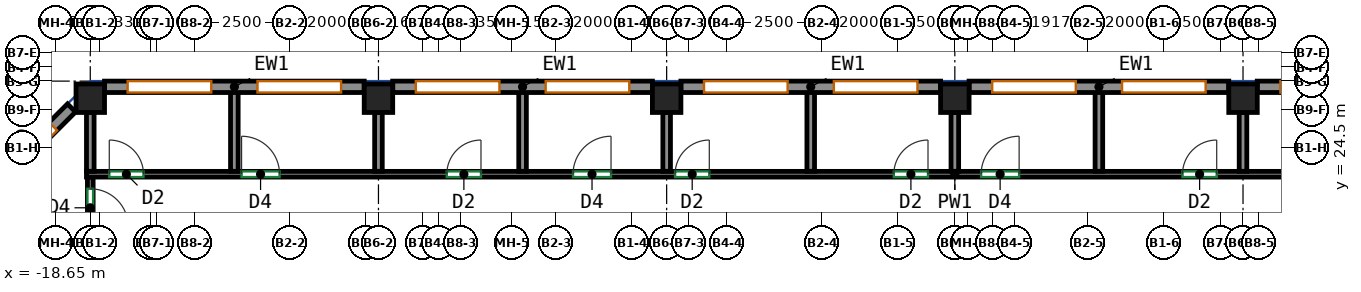
"""IFC4 building model, lengths in metres.
Left out: names, types, materials, properties, quantities, classifications, styles, units other than length and angle.
Written with IfcOpenShell. Run it as: python <this file> out.ifc"""

import sys

from ifc_helpers import new_model, si_unit, direction, frame, frame_2d, origin, origin_2d, place, context, subcontext, project, spatial, rectangle, extrude, source, transform, mapped, element, fill, save


model = new_model("IFC4")
c1 = context("Model", 3, precision=1e-05, world=origin(), true_north=direction((0.0, 1.0)))
c2 = subcontext(c1, "Body", "Model", "MODEL_VIEW")
j1 = project(units=[si_unit("LENGTHUNIT", "METRE"), si_unit("PLANEANGLEUNIT", "RADIAN")], contexts=[c1])
p1 = place(None, origin())
s1 = spatial("IfcSite", under=j1, at=p1, CompositionType="ELEMENT")
p2 = place(p1, origin())
s2 = spatial("IfcBuilding", under=s1, at=p2, CompositionType="ELEMENT")
p3 = place(p2, frame((0.0, 0.0, 206.7)))
s3 = spatial("IfcBuildingStorey", under=s2, at=p3, CompositionType="ELEMENT", Elevation=206.7)
m1 = source(origin(), c2, "Body", "SweptSolid", [
    extrude(rectangle(XDim=0.75, YDim=0.75, at=origin_2d()), origin(), (0.0, 0.0, 1.0), 3.12),
])
for number, where, z_axis, x_axis in (
    (1, (-17.75, 25.8, 0.0), (0.0, 0.0, 1.0), (1.0, 0.0, 0.0)),
    (2, (-10.167, 25.8, 0.0), (0.0, 0.0, 1.0), (1.0, 0.0, 0.0)),
    (3, (-2.583, 25.8, 0.0), (0.0, 0.0, 1.0), (1.0, 0.0, 0.0)),
    (4, (5.0, 25.8, 0.0), (0.0, 0.0, 1.0), (1.0, 0.0, 0.0)),
    (5, (12.583, 25.8, 0.0), (0.0, 0.0, 1.0), (1.0, 0.0, 0.0)),
):
    element("IfcColumn", number, at=place(p3, frame(where, z_axis=z_axis, x_axis=x_axis)), inside=s3, PredefinedType="COLUMN", context=c2, shape_type="MappedRepresentation", body=[
        mapped(m1, transform((0.0, 0.0, 0.0))),
    ])
m2 = source(origin(), c2, "Body", "SweptSolid", [
    extrude(rectangle(XDim=6.833, YDim=0.3, at=frame_2d((3.417, 0.0))), origin(), (0.0, 0.0, 1.0), 3.12),
])
p4 = place(p3, frame((19.792, 26.1, 0.0), z_axis=(0.0, 0.0, 1.0), x_axis=(-1.0, 0.0, 0.0)))
e6 = element("IfcWall", 6, at=p4, inside=s3, PredefinedType="SOLIDWALL", context=c2, shape_type="MappedRepresentation", body=[
    mapped(m2, transform((0.0, 0.0, 0.0))),
])
p5 = place(p4, frame((0.608, 0.0, 0.85)))
e7 = element("IfcOpeningElement", 7, at=p5, cuts=e6, PredefinedType="OPENING", context=c2, shape_type="SweptSolid", body=[
    extrude(rectangle(XDim=2.2, YDim=1.95, at=frame_2d((1.1, 0.975))), frame((0.0, 0.16, 0.0), z_axis=(0.0, -1.0, 0.0), x_axis=(1.0, 0.0, 0.0)), (0.0, 0.0, 1.0), 0.32),
])
p6 = place(p4, frame((4.025, 0.0, 0.85)))
e8 = element("IfcOpeningElement", 8, at=p6, cuts=e6, PredefinedType="OPENING", context=c2, shape_type="SweptSolid", body=[
    extrude(rectangle(XDim=2.2, YDim=1.95, at=frame_2d((1.1, 0.975))), frame((0.0, 0.16, 0.0), z_axis=(0.0, -1.0, 0.0), x_axis=(1.0, 0.0, 0.0)), (0.0, 0.0, 1.0), 0.32),
])
m3 = source(origin(), c2, "Body", "SweptSolid", [
    extrude(rectangle(XDim=6.833, YDim=0.3, at=frame_2d((3.417, 0.0))), origin(), (0.0, 0.0, 1.0), 3.12),
])
p7 = place(p3, frame((12.208, 26.1, 0.0), z_axis=(0.0, 0.0, 1.0), x_axis=(-1.0, 0.0, 0.0)))
e9 = element("IfcWall", 9, at=p7, inside=s3, PredefinedType="SOLIDWALL", context=c2, shape_type="MappedRepresentation", body=[
    mapped(m3, transform((0.0, 0.0, 0.0))),
])
p8 = place(p7, frame((0.608, 0.0, 0.85)))
e10 = element("IfcOpeningElement", 10, at=p8, cuts=e9, PredefinedType="OPENING", context=c2, shape_type="SweptSolid", body=[
    extrude(rectangle(XDim=2.2, YDim=1.95, at=frame_2d((1.1, 0.975))), frame((0.0, 0.16, 0.0), z_axis=(0.0, -1.0, 0.0), x_axis=(1.0, 0.0, 0.0)), (0.0, 0.0, 1.0), 0.32),
])
p9 = place(p7, frame((4.025, 0.0, 0.85)))
e11 = element("IfcOpeningElement", 11, at=p9, cuts=e9, PredefinedType="OPENING", context=c2, shape_type="SweptSolid", body=[
    extrude(rectangle(XDim=2.2, YDim=1.95, at=frame_2d((1.1, 0.975))), frame((0.0, 0.16, 0.0), z_axis=(0.0, -1.0, 0.0), x_axis=(1.0, 0.0, 0.0)), (0.0, 0.0, 1.0), 0.32),
])
p10 = place(p3, frame((4.625, 26.1, 0.0), z_axis=(0.0, 0.0, 1.0), x_axis=(-1.0, 0.0, 0.0)))
e12 = element("IfcWall", 12, at=p10, inside=s3, PredefinedType="SOLIDWALL", context=c2, shape_type="MappedRepresentation", body=[
    mapped(m3, transform((0.0, 0.0, 0.0))),
])
p11 = place(p10, frame((0.608, 0.0, 0.85)))
e13 = element("IfcOpeningElement", 13, at=p11, cuts=e12, PredefinedType="OPENING", context=c2, shape_type="SweptSolid", body=[
    extrude(rectangle(XDim=2.2, YDim=1.95, at=frame_2d((1.1, 0.975))), frame((0.0, 0.16, 0.0), z_axis=(0.0, -1.0, 0.0), x_axis=(1.0, 0.0, 0.0)), (0.0, 0.0, 1.0), 0.32),
])
p12 = place(p10, frame((4.025, 0.0, 0.85)))
e14 = element("IfcOpeningElement", 14, at=p12, cuts=e12, PredefinedType="OPENING", context=c2, shape_type="SweptSolid", body=[
    extrude(rectangle(XDim=2.2, YDim=1.95, at=frame_2d((1.1, 0.975))), frame((0.0, 0.16, 0.0), z_axis=(0.0, -1.0, 0.0), x_axis=(1.0, 0.0, 0.0)), (0.0, 0.0, 1.0), 0.32),
])
p13 = place(p3, frame((-2.958, 26.1, 0.0), z_axis=(0.0, 0.0, 1.0), x_axis=(-1.0, 0.0, 0.0)))
e15 = element("IfcWall", 15, at=p13, inside=s3, PredefinedType="SOLIDWALL", context=c2, shape_type="MappedRepresentation", body=[
    mapped(m2, transform((0.0, 0.0, 0.0))),
])
p14 = place(p13, frame((0.608, 0.0, 0.85)))
e16 = element("IfcOpeningElement", 16, at=p14, cuts=e15, PredefinedType="OPENING", context=c2, shape_type="SweptSolid", body=[
    extrude(rectangle(XDim=2.2, YDim=1.95, at=frame_2d((1.1, 0.975))), frame((0.0, 0.16, 0.0), z_axis=(0.0, -1.0, 0.0), x_axis=(1.0, 0.0, 0.0)), (0.0, 0.0, 1.0), 0.32),
])
p15 = place(p13, frame((4.025, 0.0, 0.85)))
e17 = element("IfcOpeningElement", 17, at=p15, cuts=e15, PredefinedType="OPENING", context=c2, shape_type="SweptSolid", body=[
    extrude(rectangle(XDim=2.2, YDim=1.95, at=frame_2d((1.1, 0.975))), frame((0.0, 0.16, 0.0), z_axis=(0.0, -1.0, 0.0), x_axis=(1.0, 0.0, 0.0)), (0.0, 0.0, 1.0), 0.32),
])
p16 = place(p3, frame((-10.542, 26.1, 0.0), z_axis=(0.0, 0.0, 1.0), x_axis=(-1.0, 0.0, 0.0)))
e18 = element("IfcWall", 18, at=p16, inside=s3, PredefinedType="SOLIDWALL", context=c2, shape_type="MappedRepresentation", body=[
    mapped(m3, transform((0.0, 0.0, 0.0))),
])
p17 = place(p16, frame((0.608, 0.0, 0.85)))
e19 = element("IfcOpeningElement", 19, at=p17, cuts=e18, PredefinedType="OPENING", context=c2, shape_type="SweptSolid", body=[
    extrude(rectangle(XDim=2.2, YDim=1.95, at=frame_2d((1.1, 0.975))), frame((0.0, 0.16, 0.0), z_axis=(0.0, -1.0, 0.0), x_axis=(1.0, 0.0, 0.0)), (0.0, 0.0, 1.0), 0.32),
])
p18 = place(p16, frame((4.025, 0.0, 0.85)))
e20 = element("IfcOpeningElement", 20, at=p18, cuts=e18, PredefinedType="OPENING", context=c2, shape_type="SweptSolid", body=[
    extrude(rectangle(XDim=2.2, YDim=1.95, at=frame_2d((1.1, 0.975))), frame((0.0, 0.16, 0.0), z_axis=(0.0, -1.0, 0.0), x_axis=(1.0, 0.0, 0.0)), (0.0, 0.0, 1.0), 0.32),
])
m4 = source(origin(), c2, "Body", "SweptSolid", [
    extrude(rectangle(XDim=3.571, YDim=0.3, at=frame_2d((1.786, 0.0))), origin(), (0.0, 0.0, 1.0), 3.12),
])
p19 = place(p3, frame((-18.244, 25.544, 0.0), z_axis=(0.0, 0.0, 1.0), x_axis=(-0.707072595841, -0.707140964879, 0.0)))
e21 = element("IfcWall", 21, at=p19, inside=s3, PredefinedType="SOLIDWALL", context=c2, shape_type="MappedRepresentation", body=[
    mapped(m4, transform((0.0, 0.0, 0.0))),
])
p20 = place(p19, frame((0.686, 0.0, 0.85)))
e22 = element("IfcOpeningElement", 22, at=p20, cuts=e21, PredefinedType="OPENING", context=c2, shape_type="SweptSolid", body=[
    extrude(rectangle(XDim=2.2, YDim=1.95, at=frame_2d((1.1, 0.975))), frame((0.0, 0.16, 0.0), z_axis=(0.0, -1.0, 0.0), x_axis=(1.0, 0.0, 0.0)), (0.0, 0.0, 1.0), 0.32),
])
p21 = place(p3, frame((-17.75, 23.725, 0.0), z_axis=(0.0, 0.0, 1.0), x_axis=(0.0, -1.0, 0.0)))
e23 = element("IfcWall", 23, at=p21, inside=s3, PredefinedType="PARTITIONING", context=c2, shape_type="SweptSolid", body=[
    extrude(rectangle(XDim=1.725, YDim=0.15, at=frame_2d((0.863, 0.0))), origin(), (0.0, 0.0, 1.0), 3.12),
])
p22 = place(p21, frame((0.308, 0.0, 0.0)))
e24 = element("IfcOpeningElement", 24, at=p22, cuts=e23, PredefinedType="OPENING", context=c2, shape_type="SweptSolid", body=[
    extrude(rectangle(XDim=1.0, YDim=2.1, at=frame_2d((0.5, 1.05))), frame((0.0, 0.085, 0.0), z_axis=(0.0, -1.0, 0.0), x_axis=(1.0, 0.0, 0.0)), (0.0, 0.0, 1.0), 0.17),
])
p23 = place(p3, frame((-17.85, 23.8, 0.0), z_axis=(0.0, 0.0, 1.0), x_axis=(1.0, 0.0, 0.0)))
e25 = element("IfcWall", 25, at=p23, inside=s3, PredefinedType="PARTITIONING", context=c2, shape_type="SweptSolid", body=[
    extrude(rectangle(XDim=45.7, YDim=0.15, at=frame_2d((22.85, 0.0))), origin(), (0.0, 0.0, 1.0), 3.12),
])
p24 = place(p23, frame((0.6, 0.0, 0.0)))
e26 = element("IfcOpeningElement", 26, at=p24, cuts=e25, PredefinedType="OPENING", context=c2, shape_type="SweptSolid", body=[
    extrude(rectangle(XDim=0.9, YDim=2.1, at=frame_2d((0.45, 1.05))), frame((0.0, 0.085, 0.0), z_axis=(0.0, -1.0, 0.0), x_axis=(1.0, 0.0, 0.0)), (0.0, 0.0, 1.0), 0.17),
])
p25 = place(p23, frame((4.081, 0.0, 0.0)))
e27 = element("IfcOpeningElement", 27, at=p25, cuts=e25, PredefinedType="OPENING", context=c2, shape_type="SweptSolid", body=[
    extrude(rectangle(XDim=1.0, YDim=2.1, at=frame_2d((0.5, 1.05))), frame((0.0, 0.085, 0.0), z_axis=(0.0, -1.0, 0.0), x_axis=(1.0, 0.0, 0.0)), (0.0, 0.0, 1.0), 0.17),
])
p26 = place(p23, frame((9.481, 0.0, 0.0)))
e28 = element("IfcOpeningElement", 28, at=p26, cuts=e25, PredefinedType="OPENING", context=c2, shape_type="SweptSolid", body=[
    extrude(rectangle(XDim=0.9, YDim=2.1, at=frame_2d((0.45, 1.05))), frame((0.0, 0.085, 0.0), z_axis=(0.0, -1.0, 0.0), x_axis=(1.0, 0.0, 0.0)), (0.0, 0.0, 1.0), 0.17),
])
p27 = place(p23, frame((12.803, 0.0, 0.0)))
e29 = element("IfcOpeningElement", 29, at=p27, cuts=e25, PredefinedType="OPENING", context=c2, shape_type="SweptSolid", body=[
    extrude(rectangle(XDim=1.0, YDim=2.1, at=frame_2d((0.5, 1.05))), frame((0.0, 0.085, 0.0), z_axis=(0.0, -1.0, 0.0), x_axis=(1.0, 0.0, 0.0)), (0.0, 0.0, 1.0), 0.17),
])
p28 = place(p23, frame((15.489, 0.0, 0.0)))
e30 = element("IfcOpeningElement", 30, at=p28, cuts=e25, PredefinedType="OPENING", context=c2, shape_type="SweptSolid", body=[
    extrude(rectangle(XDim=0.9, YDim=2.1, at=frame_2d((0.45, 1.05))), frame((0.0, 0.085, 0.0), z_axis=(0.0, -1.0, 0.0), x_axis=(1.0, 0.0, 0.0)), (0.0, 0.0, 1.0), 0.17),
])
p29 = place(p23, frame((21.244, 0.0, 0.0)))
e31 = element("IfcOpeningElement", 31, at=p29, cuts=e25, PredefinedType="OPENING", context=c2, shape_type="SweptSolid", body=[
    extrude(rectangle(XDim=0.9, YDim=2.1, at=frame_2d((0.45, 1.05))), frame((0.0, 0.085, 0.0), z_axis=(0.0, -1.0, 0.0), x_axis=(1.0, 0.0, 0.0)), (0.0, 0.0, 1.0), 0.17),
])
p30 = place(p23, frame((23.542, 0.0, 0.0)))
e32 = element("IfcOpeningElement", 32, at=p30, cuts=e25, PredefinedType="OPENING", context=c2, shape_type="SweptSolid", body=[
    extrude(rectangle(XDim=1.0, YDim=2.1, at=frame_2d((0.5, 1.05))), frame((0.0, 0.085, 0.0), z_axis=(0.0, -1.0, 0.0), x_axis=(1.0, 0.0, 0.0)), (0.0, 0.0, 1.0), 0.17),
])
p31 = place(p23, frame((28.841, 0.0, 0.0)))
e33 = element("IfcOpeningElement", 33, at=p31, cuts=e25, PredefinedType="OPENING", context=c2, shape_type="SweptSolid", body=[
    extrude(rectangle(XDim=0.9, YDim=2.1, at=frame_2d((0.45, 1.05))), frame((0.0, 0.085, 0.0), z_axis=(0.0, -1.0, 0.0), x_axis=(1.0, 0.0, 0.0)), (0.0, 0.0, 1.0), 0.17),
])
p32 = place(p23, frame((32.331, 0.0, 0.0)))
e34 = element("IfcOpeningElement", 34, at=p32, cuts=e25, PredefinedType="OPENING", context=c2, shape_type="SweptSolid", body=[
    extrude(rectangle(XDim=1.0, YDim=2.1, at=frame_2d((0.5, 1.05))), frame((0.0, 0.085, 0.0), z_axis=(0.0, -1.0, 0.0), x_axis=(1.0, 0.0, 0.0)), (0.0, 0.0, 1.0), 0.17),
])
p33 = place(p23, frame((35.42, 0.0, 0.0)))
e35 = element("IfcOpeningElement", 35, at=p33, cuts=e25, PredefinedType="OPENING", context=c2, shape_type="SweptSolid", body=[
    extrude(rectangle(XDim=0.9, YDim=2.1, at=frame_2d((0.45, 1.05))), frame((0.0, 0.085, 0.0), z_axis=(0.0, -1.0, 0.0), x_axis=(1.0, 0.0, 0.0)), (0.0, 0.0, 1.0), 0.17),
])
p34 = place(p23, frame((40.317, 0.0, 0.0)))
e36 = element("IfcOpeningElement", 36, at=p34, cuts=e25, PredefinedType="OPENING", context=c2, shape_type="SweptSolid", body=[
    extrude(rectangle(XDim=0.9, YDim=2.1, at=frame_2d((0.45, 1.05))), frame((0.0, 0.085, 0.0), z_axis=(0.0, -1.0, 0.0), x_axis=(1.0, 0.0, 0.0)), (0.0, 0.0, 1.0), 0.17),
])
p35 = place(p23, frame((43.199, 0.0, 0.0)))
e37 = element("IfcOpeningElement", 37, at=p35, cuts=e25, PredefinedType="OPENING", context=c2, shape_type="SweptSolid", body=[
    extrude(rectangle(XDim=1.0, YDim=2.1, at=frame_2d((0.5, 1.05))), frame((0.0, 0.085, 0.0), z_axis=(0.0, -1.0, 0.0), x_axis=(1.0, 0.0, 0.0)), (0.0, 0.0, 1.0), 0.17),
])
p36 = place(p3, frame((-17.75, 23.877, 0.0), z_axis=(0.0, 0.0, 1.0), x_axis=(0.0, 1.0, 0.0)))
e38 = element("IfcWall", 38, at=p36, inside=s3, PredefinedType="PARTITIONING", context=c2, shape_type="SweptSolid", body=[
    extrude(rectangle(XDim=1.548, YDim=0.2, at=frame_2d((0.774, 0.0))), origin(), (0.0, 0.0, 1.0), 3.12),
])
p37 = place(p3, frame((-13.959, 23.877, 0.0), z_axis=(0.0, 0.0, 1.0), x_axis=(0.0, 1.0, 0.0)))
e39 = element("IfcWall", 39, at=p37, inside=s3, PredefinedType="PARTITIONING", context=c2, shape_type="SweptSolid", body=[
    extrude(rectangle(XDim=2.123, YDim=0.2, at=frame_2d((1.062, 0.0))), origin(), (0.0, 0.0, 1.0), 3.12),
])
p38 = place(p3, frame((-10.167, 23.877, 0.0), z_axis=(0.0, 0.0, 1.0), x_axis=(0.0, 1.0, 0.0)))
e40 = element("IfcWall", 40, at=p38, inside=s3, PredefinedType="PARTITIONING", context=c2, shape_type="SweptSolid", body=[
    extrude(rectangle(XDim=1.548, YDim=0.2, at=frame_2d((0.774, 0.0))), origin(), (0.0, 0.0, 1.0), 3.12),
])
p39 = place(p3, frame((-6.375, 23.877, 0.0), z_axis=(0.0, 0.0, 1.0), x_axis=(0.0, 1.0, 0.0)))
e41 = element("IfcWall", 41, at=p39, inside=s3, PredefinedType="PARTITIONING", context=c2, shape_type="SweptSolid", body=[
    extrude(rectangle(XDim=2.123, YDim=0.2, at=frame_2d((1.062, 0.0))), origin(), (0.0, 0.0, 1.0), 3.12),
])
p40 = place(p3, frame((-2.583, 23.877, 0.0), z_axis=(0.0, 0.0, 1.0), x_axis=(0.0, 1.0, 0.0)))
e42 = element("IfcWall", 42, at=p40, inside=s3, PredefinedType="PARTITIONING", context=c2, shape_type="SweptSolid", body=[
    extrude(rectangle(XDim=1.548, YDim=0.2, at=frame_2d((0.774, 0.0))), origin(), (0.0, 0.0, 1.0), 3.12),
])
p41 = place(p3, frame((1.208, 23.877, 0.0), z_axis=(0.0, 0.0, 1.0), x_axis=(0.0, 1.0, 0.0)))
e43 = element("IfcWall", 43, at=p41, inside=s3, PredefinedType="PARTITIONING", context=c2, shape_type="SweptSolid", body=[
    extrude(rectangle(XDim=2.123, YDim=0.2, at=frame_2d((1.062, 0.0))), origin(), (0.0, 0.0, 1.0), 3.12),
])
p42 = place(p3, frame((5.0, 23.877, 0.0), z_axis=(0.0, 0.0, 1.0), x_axis=(0.0, 1.0, 0.0)))
e44 = element("IfcWall", 44, at=p42, inside=s3, PredefinedType="PARTITIONING", context=c2, shape_type="SweptSolid", body=[
    extrude(rectangle(XDim=1.548, YDim=0.2, at=frame_2d((0.774, 0.0))), origin(), (0.0, 0.0, 1.0), 3.12),
])
p43 = place(p3, frame((8.791, 23.877, 0.0), z_axis=(0.0, 0.0, 1.0), x_axis=(0.0, 1.0, 0.0)))
e45 = element("IfcWall", 45, at=p43, inside=s3, PredefinedType="PARTITIONING", context=c2, shape_type="SweptSolid", body=[
    extrude(rectangle(XDim=2.123, YDim=0.2, at=frame_2d((1.062, 0.0))), origin(), (0.0, 0.0, 1.0), 3.12),
])
p44 = place(p3, frame((12.583, 23.877, 0.0), z_axis=(0.0, 0.0, 1.0), x_axis=(0.0, 1.0, 0.0)))
e46 = element("IfcWall", 46, at=p44, inside=s3, PredefinedType="PARTITIONING", context=c2, shape_type="SweptSolid", body=[
    extrude(rectangle(XDim=1.548, YDim=0.2, at=frame_2d((0.774, 0.0))), origin(), (0.0, 0.0, 1.0), 3.12),
])
p45 = place(p6, origin())
e47 = element("IfcWindow", 47, at=p45, inside=s3, PartitioningType="SINGLE_PANEL", PredefinedType="WINDOW", context=c2, shape_type="SweptSolid", body=[
    extrude(rectangle(XDim=2.2, YDim=1.95, at=frame_2d((1.1, 0.975))), frame((0.0, 0.03, 0.0), z_axis=(0.0, -1.0, 0.0), x_axis=(1.0, 0.0, 0.0)), (0.0, 0.0, 1.0), 0.06),
])
fill(e8, e47)
p46 = place(p8, origin())
e48 = element("IfcWindow", 48, at=p46, inside=s3, PartitioningType="SINGLE_PANEL", PredefinedType="WINDOW", context=c2, shape_type="SweptSolid", body=[
    extrude(rectangle(XDim=2.2, YDim=1.95, at=frame_2d((1.1, 0.975))), frame((0.0, 0.03, 0.0), z_axis=(0.0, -1.0, 0.0), x_axis=(1.0, 0.0, 0.0)), (0.0, 0.0, 1.0), 0.06),
])
fill(e10, e48)
p47 = place(p9, origin())
e49 = element("IfcWindow", 49, at=p47, inside=s3, PartitioningType="SINGLE_PANEL", PredefinedType="WINDOW", context=c2, shape_type="SweptSolid", body=[
    extrude(rectangle(XDim=2.2, YDim=1.95, at=frame_2d((1.1, 0.975))), frame((0.0, 0.03, 0.0), z_axis=(0.0, -1.0, 0.0), x_axis=(1.0, 0.0, 0.0)), (0.0, 0.0, 1.0), 0.06),
])
fill(e11, e49)
p48 = place(p11, origin())
e50 = element("IfcWindow", 50, at=p48, inside=s3, PartitioningType="SINGLE_PANEL", PredefinedType="WINDOW", context=c2, shape_type="SweptSolid", body=[
    extrude(rectangle(XDim=2.2, YDim=1.95, at=frame_2d((1.1, 0.975))), frame((0.0, 0.03, 0.0), z_axis=(0.0, -1.0, 0.0), x_axis=(1.0, 0.0, 0.0)), (0.0, 0.0, 1.0), 0.06),
])
fill(e13, e50)
p49 = place(p12, origin())
e51 = element("IfcWindow", 51, at=p49, inside=s3, PartitioningType="SINGLE_PANEL", PredefinedType="WINDOW", context=c2, shape_type="SweptSolid", body=[
    extrude(rectangle(XDim=2.2, YDim=1.95, at=frame_2d((1.1, 0.975))), frame((0.0, 0.03, 0.0), z_axis=(0.0, -1.0, 0.0), x_axis=(1.0, 0.0, 0.0)), (0.0, 0.0, 1.0), 0.06),
])
fill(e14, e51)
p50 = place(p14, origin())
e52 = element("IfcWindow", 52, at=p50, inside=s3, PartitioningType="SINGLE_PANEL", PredefinedType="WINDOW", context=c2, shape_type="SweptSolid", body=[
    extrude(rectangle(XDim=2.2, YDim=1.95, at=frame_2d((1.1, 0.975))), frame((0.0, 0.03, 0.0), z_axis=(0.0, -1.0, 0.0), x_axis=(1.0, 0.0, 0.0)), (0.0, 0.0, 1.0), 0.06),
])
fill(e16, e52)
p51 = place(p15, origin())
e53 = element("IfcWindow", 53, at=p51, inside=s3, PartitioningType="SINGLE_PANEL", PredefinedType="WINDOW", context=c2, shape_type="SweptSolid", body=[
    extrude(rectangle(XDim=2.2, YDim=1.95, at=frame_2d((1.1, 0.975))), frame((0.0, 0.03, 0.0), z_axis=(0.0, -1.0, 0.0), x_axis=(1.0, 0.0, 0.0)), (0.0, 0.0, 1.0), 0.06),
])
fill(e17, e53)
p52 = place(p17, origin())
e54 = element("IfcWindow", 54, at=p52, inside=s3, PartitioningType="SINGLE_PANEL", PredefinedType="WINDOW", context=c2, shape_type="SweptSolid", body=[
    extrude(rectangle(XDim=2.2, YDim=1.95, at=frame_2d((1.1, 0.975))), frame((0.0, 0.03, 0.0), z_axis=(0.0, -1.0, 0.0), x_axis=(1.0, 0.0, 0.0)), (0.0, 0.0, 1.0), 0.06),
])
fill(e19, e54)
p53 = place(p18, origin())
e55 = element("IfcWindow", 55, at=p53, inside=s3, PartitioningType="SINGLE_PANEL", PredefinedType="WINDOW", context=c2, shape_type="SweptSolid", body=[
    extrude(rectangle(XDim=2.2, YDim=1.95, at=frame_2d((1.1, 0.975))), frame((0.0, 0.03, 0.0), z_axis=(0.0, -1.0, 0.0), x_axis=(1.0, 0.0, 0.0)), (0.0, 0.0, 1.0), 0.06),
])
fill(e20, e55)
p54 = place(p20, origin())
e56 = element("IfcWindow", 56, at=p54, inside=s3, PartitioningType="SINGLE_PANEL", PredefinedType="WINDOW", context=c2, shape_type="SweptSolid", body=[
    extrude(rectangle(XDim=2.2, YDim=1.95, at=frame_2d((1.1, 0.975))), frame((0.0, 0.03, 0.0), z_axis=(0.0, -1.0, 0.0), x_axis=(1.0, 0.0, 0.0)), (0.0, 0.0, 1.0), 0.06),
])
fill(e22, e56)
p55 = place(p22, origin())
e57 = element("IfcDoor", 57, at=p55, inside=s3, OperationType="SINGLE_SWING_RIGHT", PredefinedType="DOOR", context=c2, shape_type="SweptSolid", body=[
    extrude(rectangle(XDim=1.0, YDim=2.1, at=frame_2d((0.5, 1.05))), frame((0.0, 0.025, 0.0), z_axis=(0.0, -1.0, 0.0), x_axis=(1.0, 0.0, 0.0)), (0.0, 0.0, 1.0), 0.05),
])
fill(e24, e57)
p56 = place(p24, origin())
e58 = element("IfcDoor", 58, at=p56, inside=s3, OperationType="SINGLE_SWING_LEFT", PredefinedType="DOOR", context=c2, shape_type="SweptSolid", body=[
    extrude(rectangle(XDim=0.9, YDim=2.1, at=frame_2d((0.45, 1.05))), frame((0.0, 0.025, 0.0), z_axis=(0.0, -1.0, 0.0), x_axis=(1.0, 0.0, 0.0)), (0.0, 0.0, 1.0), 0.05),
])
fill(e26, e58)
p57 = place(p25, origin())
e59 = element("IfcDoor", 59, at=p57, inside=s3, OperationType="SINGLE_SWING_LEFT", PredefinedType="DOOR", context=c2, shape_type="SweptSolid", body=[
    extrude(rectangle(XDim=1.0, YDim=2.1, at=frame_2d((0.5, 1.05))), frame((0.0, 0.025, 0.0), z_axis=(0.0, -1.0, 0.0), x_axis=(1.0, 0.0, 0.0)), (0.0, 0.0, 1.0), 0.05),
])
fill(e27, e59)
p58 = place(p26, origin())
e60 = element("IfcDoor", 60, at=p58, inside=s3, OperationType="SINGLE_SWING_RIGHT", PredefinedType="DOOR", context=c2, shape_type="SweptSolid", body=[
    extrude(rectangle(XDim=0.9, YDim=2.1, at=frame_2d((0.45, 1.05))), frame((0.0, 0.025, 0.0), z_axis=(0.0, -1.0, 0.0), x_axis=(1.0, 0.0, 0.0)), (0.0, 0.0, 1.0), 0.05),
])
fill(e28, e60)
p59 = place(p27, origin())
e61 = element("IfcDoor", 61, at=p59, inside=s3, OperationType="SINGLE_SWING_RIGHT", PredefinedType="DOOR", context=c2, shape_type="SweptSolid", body=[
    extrude(rectangle(XDim=1.0, YDim=2.1, at=frame_2d((0.5, 1.05))), frame((0.0, 0.025, 0.0), z_axis=(0.0, -1.0, 0.0), x_axis=(1.0, 0.0, 0.0)), (0.0, 0.0, 1.0), 0.05),
])
fill(e29, e61)
p60 = place(p28, origin())
e62 = element("IfcDoor", 62, at=p60, inside=s3, OperationType="SINGLE_SWING_RIGHT", PredefinedType="DOOR", context=c2, shape_type="SweptSolid", body=[
    extrude(rectangle(XDim=0.9, YDim=2.1, at=frame_2d((0.45, 1.05))), frame((0.0, 0.025, 0.0), z_axis=(0.0, -1.0, 0.0), x_axis=(1.0, 0.0, 0.0)), (0.0, 0.0, 1.0), 0.05),
])
fill(e30, e62)
p61 = place(p29, origin())
e63 = element("IfcDoor", 63, at=p61, inside=s3, OperationType="SINGLE_SWING_RIGHT", PredefinedType="DOOR", context=c2, shape_type="SweptSolid", body=[
    extrude(rectangle(XDim=0.9, YDim=2.1, at=frame_2d((0.45, 1.05))), frame((0.0, 0.025, 0.0), z_axis=(0.0, -1.0, 0.0), x_axis=(1.0, 0.0, 0.0)), (0.0, 0.0, 1.0), 0.05),
])
fill(e31, e63)
p62 = place(p30, origin())
e64 = element("IfcDoor", 64, at=p62, inside=s3, OperationType="SINGLE_SWING_RIGHT", PredefinedType="DOOR", context=c2, shape_type="SweptSolid", body=[
    extrude(rectangle(XDim=1.0, YDim=2.1, at=frame_2d((0.5, 1.05))), frame((0.0, 0.025, 0.0), z_axis=(0.0, -1.0, 0.0), x_axis=(1.0, 0.0, 0.0)), (0.0, 0.0, 1.0), 0.05),
])
fill(e32, e64)
p63 = place(p31, origin())
e65 = element("IfcDoor", 65, at=p63, inside=s3, OperationType="SINGLE_SWING_RIGHT", PredefinedType="DOOR", context=c2, shape_type="SweptSolid", body=[
    extrude(rectangle(XDim=0.9, YDim=2.1, at=frame_2d((0.45, 1.05))), frame((0.0, 0.025, 0.0), z_axis=(0.0, -1.0, 0.0), x_axis=(1.0, 0.0, 0.0)), (0.0, 0.0, 1.0), 0.05),
])
fill(e33, e65)
save(model, sys.argv[1])
